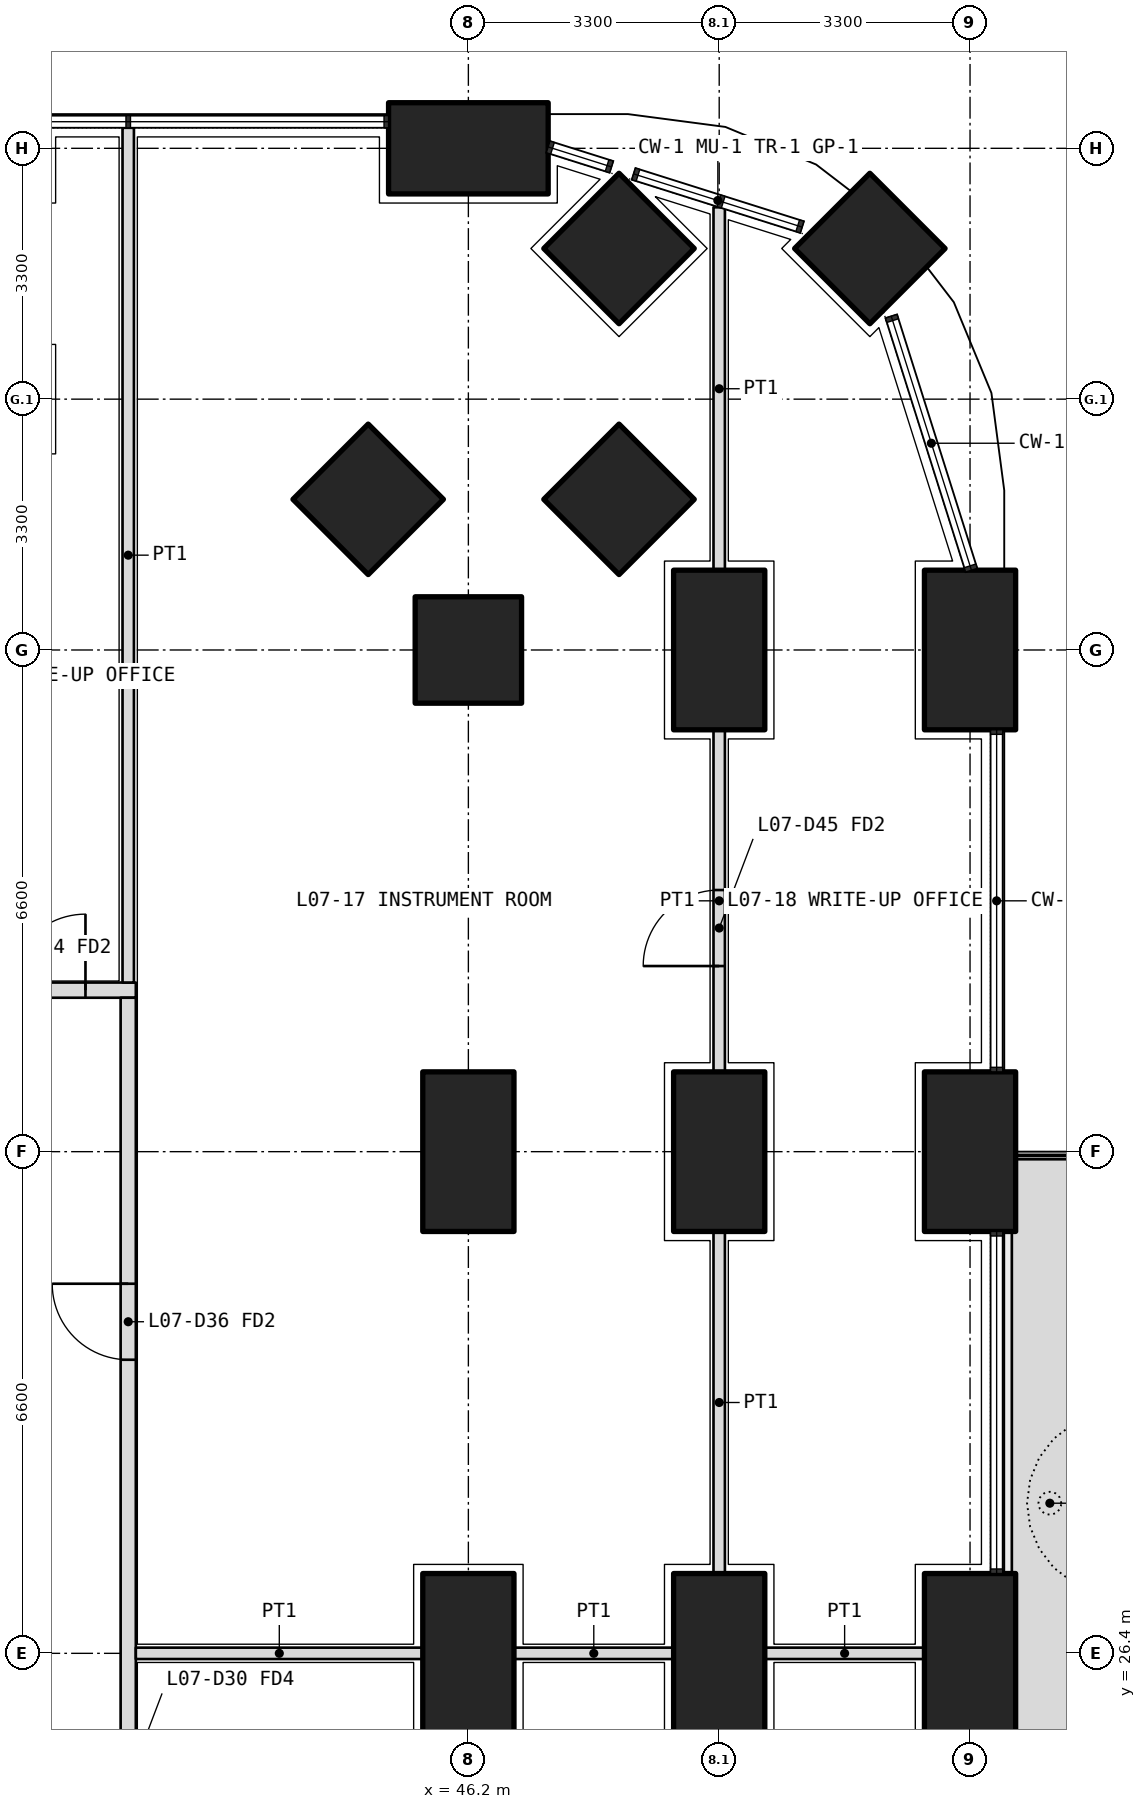
"""IFC4 building model, lengths in metres.
Left out: names, types, materials, properties, quantities, classifications, styles, units other than length and angle.
Written with IfcOpenShell. Run it as: python <this file> out.ifc"""

import sys

from ifc_helpers import new_model, si_unit, direction, frame, frame_2d, origin, origin_2d, place, context, subcontext, project, spatial, polyline, rectangle, outline, extrude, element, fill, save


model = new_model("IFC4")
c1 = context("Model", 3, precision=1e-05, world=origin(), true_north=direction((0.0, 1.0)))
c2 = subcontext(c1, "Body", "Model", "MODEL_VIEW")
j1 = project(units=[si_unit("LENGTHUNIT", "METRE"), si_unit("PLANEANGLEUNIT", "RADIAN")], contexts=[c1])
p1 = place(None, origin())
s1 = spatial("IfcSite", under=j1, at=p1, CompositionType="ELEMENT")
p2 = place(p1, origin())
s2 = spatial("IfcBuilding", under=s1, at=p2, CompositionType="ELEMENT")
p3 = place(p2, frame((0.0, 0.0, 33.9)))
s3 = spatial("IfcBuildingStorey", under=s2, at=p3, CompositionType="ELEMENT", Elevation=33.9)
p4 = place(p3, frame((51.482, 44.882, 0.0), z_axis=(0.0, 0.0, 1.0), x_axis=(0.707106781187, 0.707106781187, 0.0)))
e1 = element("IfcColumn", 1, at=p4, inside=s3, PredefinedType="COLUMN", context=c2, shape_type="SweptSolid", body=[
    extrude(rectangle(XDim=1.4, YDim=1.4, at=origin_2d()), origin(), (0.0, 0.0, 1.0), 4.2),
])
for number, where, z_axis, x_axis in (
    (2, (52.8, 26.4, 0.0), (0.0, 0.0, 1.0), (0.0, 1.0, 0.0)),
    (3, (52.8, 33.0, 0.0), (0.0, 0.0, 1.0), (0.0, 1.0, 0.0)),
    (4, (52.8, 39.6, 0.0), (0.0, 0.0, 1.0), (0.0, 1.0, 0.0)),
    (5, (46.2, 46.2, 0.0), (0.0, 0.0, 1.0), (1.0, 0.0, 0.0)),
):
    element("IfcColumn", number, at=place(p3, frame(where, z_axis=z_axis, x_axis=x_axis)), inside=s3, PredefinedType="COLUMN", context=c2, shape_type="SweptSolid", body=[
        extrude(rectangle(XDim=2.1, YDim=1.2, at=origin_2d()), origin(), (0.0, 0.0, 1.0), 4.2),
    ])
for number, where, z_axis, x_axis in (
    (6, (46.2, 39.6, 0.0), (0.0, 0.0, 1.0), (1.0, 0.0, 0.0)),
    (7, (48.182, 44.882, 0.0), (0.0, 0.0, 1.0), (0.707, 0.707, 0.0)),
):
    element("IfcColumn", number, at=place(p3, frame(where, z_axis=z_axis, x_axis=x_axis)), inside=s3, PredefinedType="COLUMN", context=c2, shape_type="SweptSolid", body=[
        extrude(rectangle(XDim=1.4, YDim=1.4, at=origin_2d()), origin(), (0.0, 0.0, 1.0), 4.2),
    ])
for number, where, z_axis, x_axis in (
    (8, (49.5, 26.4, 0.0), (0.0, 0.0, 1.0), (0.0, 1.0, 0.0)),
    (9, (49.5, 33.0, 0.0), (0.0, 0.0, 1.0), (0.0, 1.0, 0.0)),
    (10, (49.5, 39.6, 0.0), (0.0, 0.0, 1.0), (0.0, 1.0, 0.0)),
):
    element("IfcColumn", number, at=place(p3, frame(where, z_axis=z_axis, x_axis=x_axis)), inside=s3, PredefinedType="COLUMN", context=c2, shape_type="SweptSolid", body=[
        extrude(rectangle(XDim=2.1, YDim=1.2, at=origin_2d()), origin(), (0.0, 0.0, 1.0), 4.2),
    ])
for number, where, z_axis, x_axis in (
    (11, (48.182, 41.582, 0.0), (0.0, 0.0, 1.0), (0.707, 0.707, 0.0)),
    (12, (44.882, 41.582, 0.0), (0.0, 0.0, 1.0), (0.707, 0.707, 0.0)),
):
    element("IfcColumn", number, at=place(p3, frame(where, z_axis=z_axis, x_axis=x_axis)), inside=s3, PredefinedType="COLUMN", context=c2, shape_type="SweptSolid", body=[
        extrude(rectangle(XDim=1.4, YDim=1.4, at=origin_2d()), origin(), (0.0, 0.0, 1.0), 4.2),
    ])
for number, where, z_axis, x_axis in (
    (13, (46.2, 26.4, 0.0), (0.0, 0.0, 1.0), (0.0, 1.0, 0.0)),
    (14, (46.2, 33.0, 0.0), (0.0, 0.0, 1.0), (0.0, 1.0, 0.0)),
):
    element("IfcColumn", number, at=place(p3, frame(where, z_axis=z_axis, x_axis=x_axis)), inside=s3, PredefinedType="COLUMN", context=c2, shape_type="SweptSolid", body=[
        extrude(rectangle(XDim=2.1, YDim=1.2, at=origin_2d()), origin(), (0.0, 0.0, 1.0), 4.2),
    ])
p5 = place(p3, origin())
e15 = element("IfcWall", 15, at=p5, inside=s3, PredefinedType="USERDEFINED", context=c2, shape_type="SweptSolid", body=[
    extrude(outline(polyline([(53.35, 23.85), (54.35, 23.85), (54.35, 32.9), (53.35, 32.9), (53.35, 23.85)]), holes=[polyline([(53.5, 24.0), (54.2, 24.0), (54.2, 32.75), (53.5, 32.75), (53.5, 24.0)])]), origin(), (0.0, 0.0, 1.0), 1.05),
])
p6 = place(p3, frame((33.0, 35.125, 0.0), z_axis=(0.0, 0.0, 1.0), x_axis=(1.0, 0.0, 0.0)))
e16 = element("IfcWall", 16, at=p6, inside=s3, PredefinedType="PARTITIONING", context=c2, shape_type="SweptSolid", body=[
    extrude(rectangle(XDim=8.825, YDim=0.2, at=frame_2d((4.413, 0.0))), origin(), (0.0, 0.0, 1.0), 2.85),
])
p7 = place(p6, frame((1.6, 0.0, 0.0)))
e17 = element("IfcOpeningElement", 17, at=p7, cuts=e16, PredefinedType="OPENING", context=c2, shape_type="SweptSolid", body=[
    extrude(rectangle(XDim=1.0, YDim=2.1, at=frame_2d((0.5, 1.05))), frame((0.0, 0.11, 0.0), z_axis=(0.0, -1.0, 0.0), x_axis=(1.0, 0.0, 0.0)), (0.0, 0.0, 1.0), 0.22),
])
p8 = place(p6, frame((4.9, 0.0, 0.0)))
e18 = element("IfcOpeningElement", 18, at=p8, cuts=e16, PredefinedType="OPENING", context=c2, shape_type="SweptSolid", body=[
    extrude(rectangle(XDim=1.0, YDim=2.1, at=frame_2d((0.5, 1.05))), frame((0.0, 0.11, 0.0), z_axis=(0.0, -1.0, 0.0), x_axis=(1.0, 0.0, 0.0)), (0.0, 0.0, 1.0), 0.22),
])
p9 = place(p6, frame((7.163, 0.0, 0.0)))
e19 = element("IfcOpeningElement", 19, at=p9, cuts=e16, PredefinedType="OPENING", context=c2, shape_type="SweptSolid", body=[
    extrude(rectangle(XDim=1.0, YDim=2.1, at=frame_2d((0.5, 1.05))), frame((0.0, 0.11, 0.0), z_axis=(0.0, -1.0, 0.0), x_axis=(1.0, 0.0, 0.0)), (0.0, 0.0, 1.0), 0.22),
])
p10 = place(p3, frame((41.725, 11.175, 0.0), z_axis=(0.0, 0.0, 1.0), x_axis=(0.0, 1.0, 0.0)))
e20 = element("IfcWall", 20, at=p10, inside=s3, PredefinedType="PARTITIONING", context=c2, shape_type="SweptSolid", body=[
    extrude(rectangle(XDim=23.85, YDim=0.2, at=frame_2d((11.925, 0.0))), origin(), (0.0, 0.0, 1.0), 2.85),
])
p11 = place(p10, frame((2.113, 0.0, 0.0)))
e21 = element("IfcOpeningElement", 21, at=p11, cuts=e20, PredefinedType="OPENING", context=c2, shape_type="SweptSolid", body=[
    extrude(rectangle(XDim=1.0, YDim=2.1, at=frame_2d((0.5, 1.05))), frame((0.0, 0.11, 0.0), z_axis=(0.0, -1.0, 0.0), x_axis=(1.0, 0.0, 0.0)), (0.0, 0.0, 1.0), 0.22),
])
p12 = place(p10, frame((6.475, 0.0, 0.0)))
e22 = element("IfcOpeningElement", 22, at=p12, cuts=e20, PredefinedType="OPENING", context=c2, shape_type="SweptSolid", body=[
    extrude(rectangle(XDim=1.0, YDim=2.1, at=frame_2d((0.5, 1.05))), frame((0.0, 0.11, 0.0), z_axis=(0.0, -1.0, 0.0), x_axis=(1.0, 0.0, 0.0)), (0.0, 0.0, 1.0), 0.22),
])
p13 = place(p10, frame((9.725, 0.0, 0.0)))
e23 = element("IfcOpeningElement", 23, at=p13, cuts=e20, PredefinedType="OPENING", context=c2, shape_type="SweptSolid", body=[
    extrude(rectangle(XDim=1.0, YDim=2.1, at=frame_2d((0.5, 1.05))), frame((0.0, 0.11, 0.0), z_axis=(0.0, -1.0, 0.0), x_axis=(1.0, 0.0, 0.0)), (0.0, 0.0, 1.0), 0.22),
])
p14 = place(p10, frame((13.075, 0.0, 0.0)))
e24 = element("IfcOpeningElement", 24, at=p14, cuts=e20, PredefinedType="OPENING", context=c2, shape_type="SweptSolid", body=[
    extrude(rectangle(XDim=0.9, YDim=2.1, at=frame_2d((0.45, 1.05))), frame((0.0, 0.11, 0.0), z_axis=(0.0, -1.0, 0.0), x_axis=(1.0, 0.0, 0.0)), (0.0, 0.0, 1.0), 0.22),
])
p15 = place(p10, frame((19.087, 0.0, 0.0)))
e25 = element("IfcOpeningElement", 25, at=p15, cuts=e20, PredefinedType="OPENING", context=c2, shape_type="SweptSolid", body=[
    extrude(rectangle(XDim=1.0, YDim=2.1, at=frame_2d((0.5, 1.05))), frame((0.0, 0.11, 0.0), z_axis=(0.0, -1.0, 0.0), x_axis=(1.0, 0.0, 0.0)), (0.0, 0.0, 1.0), 0.22),
])
p16 = place(p3, frame((41.725, 46.47, 0.0), z_axis=(0.0, 0.0, 1.0), x_axis=(0.0, -1.0, 0.0)))
e26 = element("IfcWall", 26, at=p16, inside=s3, PredefinedType="PARTITIONING", context=c2, shape_type="SweptSolid", body=[
    extrude(rectangle(XDim=11.245, YDim=0.15, at=frame_2d((5.623, 0.0))), origin(), (0.0, 0.0, 1.0), 2.7),
])
p17 = place(p3, frame((49.5, 27.45, 0.0), z_axis=(0.0, 0.0, 1.0), x_axis=(0.0, 1.0, 0.0)))
e27 = element("IfcWall", 27, at=p17, inside=s3, PredefinedType="PARTITIONING", context=c2, shape_type="SweptSolid", body=[
    extrude(rectangle(XDim=4.5, YDim=0.15, at=frame_2d((2.25, 0.0))), origin(), (0.0, 0.0, 1.0), 3.9),
])
p18 = place(p3, frame((49.5, 34.05, 0.0), z_axis=(0.0, 0.0, 1.0), x_axis=(0.0, 1.0, 0.0)))
e28 = element("IfcWall", 28, at=p18, inside=s3, PredefinedType="PARTITIONING", context=c2, shape_type="SweptSolid", body=[
    extrude(rectangle(XDim=4.5, YDim=0.15, at=frame_2d((2.25, 0.0))), origin(), (0.0, 0.0, 1.0), 3.9),
])
p19 = place(p18, frame((1.392, 0.0, 0.0)))
e29 = element("IfcOpeningElement", 29, at=p19, cuts=e28, PredefinedType="OPENING", context=c2, shape_type="SweptSolid", body=[
    extrude(rectangle(XDim=1.0, YDim=2.1, at=frame_2d((0.5, 1.05))), frame((0.0, 0.085, 0.0), z_axis=(0.0, -1.0, 0.0), x_axis=(1.0, 0.0, 0.0)), (0.0, 0.0, 1.0), 0.17),
])
p20 = place(p3, frame((49.5, 40.65, 0.0), z_axis=(0.0, 0.0, 1.0), x_axis=(0.0, 1.0, 0.0)))
e30 = element("IfcWall", 30, at=p20, inside=s3, PredefinedType="PARTITIONING", context=c2, shape_type="SweptSolid", body=[
    extrude(rectangle(XDim=4.774, YDim=0.15, at=frame_2d((2.387, 0.0))), origin(), (0.0, 0.0, 1.0), 2.7),
])
for number, where, z_axis, x_axis in (
    (31, (52.2, 26.4, 0.0), (0.0, 0.0, 1.0), (-1.0, 0.0, 0.0)),
    (32, (48.9, 26.4, 0.0), (0.0, 0.0, 1.0), (-1.0, 0.0, 0.0)),
):
    element("IfcWall", number, at=place(p3, frame(where, z_axis=z_axis, x_axis=x_axis)), inside=s3, PredefinedType="PARTITIONING", context=c2, shape_type="SweptSolid", body=[
        extrude(rectangle(XDim=2.1, YDim=0.15, at=frame_2d((1.05, 0.0))), origin(), (0.0, 0.0, 1.0), 2.85),
    ])
p21 = place(p3, frame((45.6, 26.4, 0.0), z_axis=(0.0, 0.0, 1.0), x_axis=(-1.0, 0.0, 0.0)))
e33 = element("IfcWall", 33, at=p21, inside=s3, PredefinedType="PARTITIONING", context=c2, shape_type="SweptSolid", body=[
    extrude(rectangle(XDim=3.775, YDim=0.15, at=frame_2d((1.888, 0.0))), origin(), (0.0, 0.0, 1.0), 2.85),
])
p22 = place(p15, origin())
e34 = element("IfcDoor", 34, at=p22, inside=s3, OperationType="SINGLE_SWING_RIGHT", PredefinedType="DOOR", context=c2, shape_type="SweptSolid", body=[
    extrude(rectangle(XDim=1.0, YDim=2.1, at=frame_2d((0.5, 1.05))), frame((0.0, 0.025, 0.0), z_axis=(0.0, -1.0, 0.0), x_axis=(1.0, 0.0, 0.0)), (0.0, 0.0, 1.0), 0.05),
])
fill(e25, e34)
p23 = place(p19, origin())
e35 = element("IfcDoor", 35, at=p23, inside=s3, OperationType="SINGLE_SWING_LEFT", PredefinedType="DOOR", context=c2, shape_type="SweptSolid", body=[
    extrude(rectangle(XDim=1.0, YDim=2.1, at=frame_2d((0.5, 1.05))), frame((0.0, 0.025, 0.0), z_axis=(0.0, -1.0, 0.0), x_axis=(1.0, 0.0, 0.0)), (0.0, 0.0, 1.0), 0.05),
])
fill(e29, e35)
p24 = place(p9, origin())
e36 = element("IfcDoor", 36, at=p24, inside=s3, OperationType="SINGLE_SWING_RIGHT", PredefinedType="DOOR", context=c2, shape_type="SweptSolid", body=[
    extrude(rectangle(XDim=1.0, YDim=2.1, at=frame_2d((0.5, 1.05))), frame((0.0, 0.025, 0.0), z_axis=(0.0, -1.0, 0.0), x_axis=(1.0, 0.0, 0.0)), (0.0, 0.0, 1.0), 0.05),
])
fill(e19, e36)
save(model, sys.argv[1])
